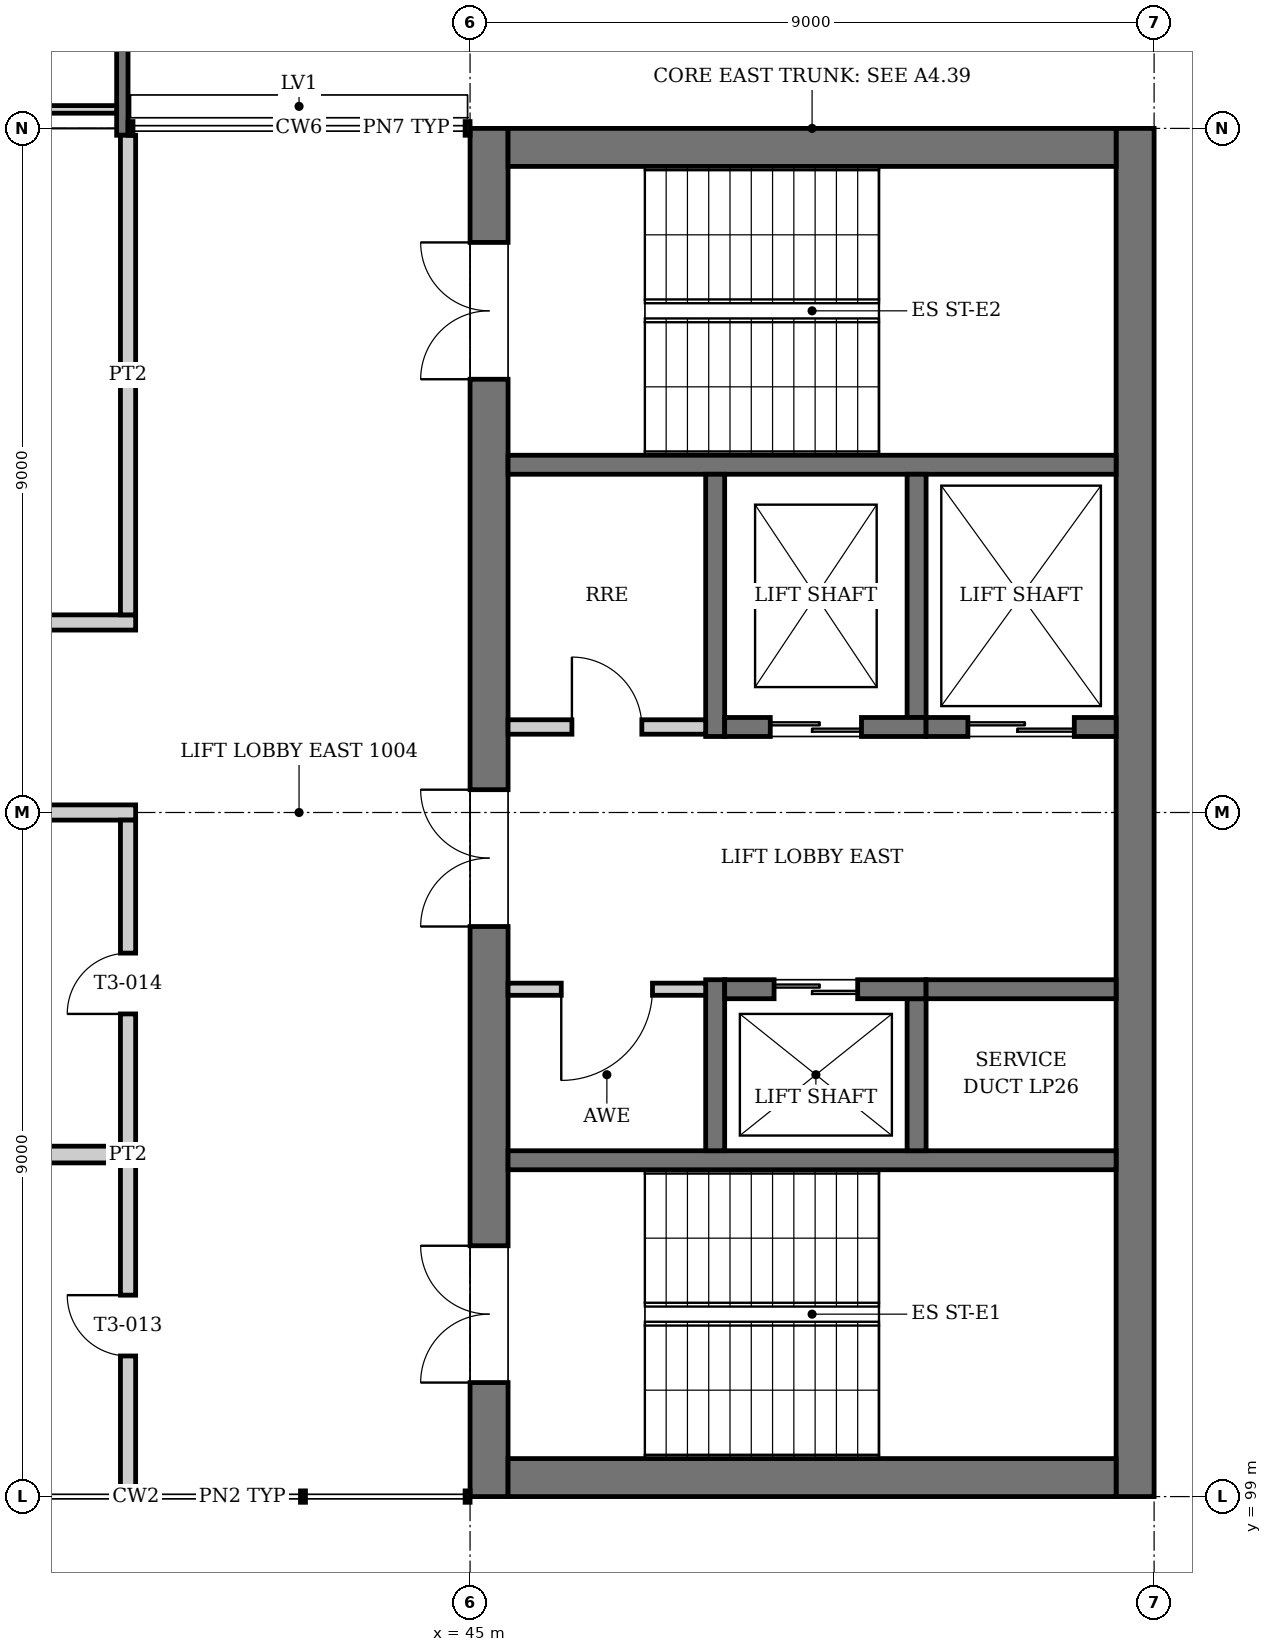
"""IFC4 building model, lengths in metres.
Left out: names, types, materials, properties, quantities, classifications, styles, units other than length and angle.
Written with IfcOpenShell. Run it as: python <this file> out.ifc"""

import sys

from ifc_helpers import new_model, si_unit, direction, frame, frame_2d, origin, place, context, subcontext, project, spatial, rectangle, extrude, element, fill, save


model = new_model("IFC4")
c1 = context("Model", 3, precision=1e-05, world=origin(), true_north=direction((0.0, 1.0)))
c2 = subcontext(c1, "Body", "Model", "MODEL_VIEW")
j1 = project(units=[si_unit("LENGTHUNIT", "METRE"), si_unit("PLANEANGLEUNIT", "RADIAN")], contexts=[c1])
p1 = place(None, origin())
s1 = spatial("IfcSite", under=j1, at=p1, CompositionType="ELEMENT")
p2 = place(p1, origin())
s2 = spatial("IfcBuilding", under=s1, at=p2, CompositionType="ELEMENT")
p3 = place(p2, frame((0.0, 0.0, 43.2)))
s3 = spatial("IfcBuildingStorey", under=s2, at=p3, CompositionType="ELEMENT", Elevation=43.2)
p4 = place(p3, frame((45.25, 99.0, 0.0), z_axis=(0.0, 0.0, 1.0), x_axis=(0.0, 1.0, 0.0)))
e1 = element("IfcWall", 1, at=p4, inside=s3, PredefinedType="SHEAR", context=c2, shape_type="SweptSolid", body=[
    extrude(rectangle(XDim=18.0, YDim=0.5, at=frame_2d((9.0, 0.0))), origin(), (0.0, 0.0, 1.0), 4.0),
])
p5 = place(p4, frame((1.5, 0.0, 0.0)))
e2 = element("IfcOpeningElement", 2, at=p5, cuts=e1, PredefinedType="OPENING", context=c2, shape_type="SweptSolid", body=[
    extrude(rectangle(XDim=1.8, YDim=2.1, at=frame_2d((0.9, 1.05))), frame((0.0, 0.26, 0.0), z_axis=(0.0, -1.0, 0.0), x_axis=(1.0, 0.0, 0.0)), (0.0, 0.0, 1.0), 0.52),
])
p6 = place(p4, frame((14.7, 0.0, 0.0)))
e3 = element("IfcOpeningElement", 3, at=p6, cuts=e1, PredefinedType="OPENING", context=c2, shape_type="SweptSolid", body=[
    extrude(rectangle(XDim=1.8, YDim=2.1, at=frame_2d((0.9, 1.05))), frame((0.0, 0.26, 0.0), z_axis=(0.0, -1.0, 0.0), x_axis=(1.0, 0.0, 0.0)), (0.0, 0.0, 1.0), 0.52),
])
p7 = place(p4, frame((7.5, 0.0, 0.0)))
e4 = element("IfcOpeningElement", 4, at=p7, cuts=e1, PredefinedType="OPENING", context=c2, shape_type="SweptSolid", body=[
    extrude(rectangle(XDim=1.8, YDim=2.1, at=frame_2d((0.9, 1.05))), frame((0.0, 0.26, 0.0), z_axis=(0.0, -1.0, 0.0), x_axis=(1.0, 0.0, 0.0)), (0.0, 0.0, 1.0), 0.52),
])
p8 = place(p3, frame((53.75, 99.0, 0.0), z_axis=(0.0, 0.0, 1.0), x_axis=(0.0, 1.0, 0.0)))
e5 = element("IfcWall", 5, at=p8, inside=s3, PredefinedType="SHEAR", context=c2, shape_type="SweptSolid", body=[
    extrude(rectangle(XDim=18.0, YDim=0.5, at=frame_2d((9.0, 0.0))), origin(), (0.0, 0.0, 1.0), 4.0),
])
for number, where, z_axis, x_axis in (
    (6, (45.5, 99.25, 0.0), (0.0, 0.0, 1.0), (1.0, 0.0, 0.0)),
    (7, (45.5, 116.75, 0.0), (0.0, 0.0, 1.0), (1.0, 0.0, 0.0)),
):
    element("IfcWall", number, at=place(p3, frame(where, z_axis=z_axis, x_axis=x_axis)), inside=s3, PredefinedType="SHEAR", context=c2, shape_type="SweptSolid", body=[
        extrude(rectangle(XDim=8.0, YDim=0.5, at=frame_2d((4.0, 0.0))), origin(), (0.0, 0.0, 1.0), 4.0),
    ])
p9 = place(p3, frame((40.425, 120.45, -0.15), z_axis=(0.0, 0.0, 1.0), x_axis=(0.0, -1.0, 0.0)))
e8 = element("IfcWall", 8, at=p9, inside=s3, PredefinedType="SOLIDWALL", context=c2, shape_type="SweptSolid", body=[
    extrude(rectangle(XDim=3.54, YDim=0.15, at=frame_2d((1.77, 0.0))), origin(), (0.0, 0.0, 1.0), 2.75),
])
p10 = place(p3, frame((31.65, 117.25, 0.0), z_axis=(0.0, 0.0, 1.0), x_axis=(1.0, 0.0, 0.0)))
e9 = element("IfcWall", 9, at=p10, inside=s3, PredefinedType="PARTITIONING", context=c2, shape_type="SweptSolid", body=[
    extrude(rectangle(XDim=8.7, YDim=0.1, at=frame_2d((4.35, 0.0))), origin(), (0.0, 0.0, 1.0), 2.6),
])
p11 = place(p10, frame((4.6, 0.0, 0.0)))
e10 = element("IfcOpeningElement", 10, at=p11, cuts=e9, PredefinedType="OPENING", context=c2, shape_type="SweptSolid", body=[
    extrude(rectangle(XDim=0.9, YDim=2.1, at=frame_2d((0.45, 1.05))), frame((0.0, 0.06, 0.0), z_axis=(0.0, -1.0, 0.0), x_axis=(1.0, 0.0, 0.0)), (0.0, 0.0, 1.0), 0.12),
])
for number, where, z_axis, x_axis in (
    (11, (45.5, 103.425, 0.0), (0.0, 0.0, 1.0), (1.0, 0.0, 0.0)),
    (12, (45.5, 112.575, 0.0), (0.0, 0.0, 1.0), (1.0, 0.0, 0.0)),
):
    element("IfcWall", number, at=place(p3, frame(where, z_axis=z_axis, x_axis=x_axis)), inside=s3, PredefinedType="SOLIDWALL", context=c2, shape_type="SweptSolid", body=[
        extrude(rectangle(XDim=8.0, YDim=0.25, at=frame_2d((4.0, 0.0))), origin(), (0.0, 0.0, 1.0), 3.75),
    ])
p12 = place(p3, frame((48.225, 103.55, 0.0), z_axis=(0.0, 0.0, 1.0), x_axis=(0.0, 1.0, 0.0)))
e13 = element("IfcWall", 13, at=p12, inside=s3, PredefinedType="SOLIDWALL", context=c2, shape_type="SweptSolid", body=[
    extrude(rectangle(XDim=2.25, YDim=0.25, at=frame_2d((1.125, 0.0))), origin(), (0.0, 0.0, 1.0), 4.0),
])
p13 = place(p3, frame((50.875, 103.55, 0.0), z_axis=(0.0, 0.0, 1.0), x_axis=(0.0, 1.0, 0.0)))
e14 = element("IfcWall", 14, at=p13, inside=s3, PredefinedType="SOLIDWALL", context=c2, shape_type="SweptSolid", body=[
    extrude(rectangle(XDim=2.0, YDim=0.25, at=frame_2d((1.0, 0.0))), origin(), (0.0, 0.0, 1.0), 4.0),
])
p14 = place(p3, frame((48.35, 105.675, 0.0), z_axis=(0.0, 0.0, 1.0), x_axis=(1.0, 0.0, 0.0)))
e15 = element("IfcWall", 15, at=p14, inside=s3, PredefinedType="SOLIDWALL", context=c2, shape_type="SweptSolid", body=[
    extrude(rectangle(XDim=2.65, YDim=0.25, at=frame_2d((1.325, 0.0))), origin(), (0.0, 0.0, 1.0), 4.0),
])
p15 = place(p14, frame((0.65, 0.0, 0.0)))
e16 = element("IfcOpeningElement", 16, at=p15, cuts=e15, PredefinedType="OPENING", context=c2, shape_type="SweptSolid", body=[
    extrude(rectangle(XDim=1.1, YDim=2.1, at=frame_2d((0.55, 1.05))), frame((0.0, 0.135, 0.0), z_axis=(0.0, -1.0, 0.0), x_axis=(1.0, 0.0, 0.0)), (0.0, 0.0, 1.0), 0.27),
])
p16 = place(p3, frame((51.0, 105.675, 0.0), z_axis=(0.0, 0.0, 1.0), x_axis=(1.0, 0.0, 0.0)))
e17 = element("IfcWall", 17, at=p16, inside=s3, PredefinedType="SOLIDWALL", context=c2, shape_type="SweptSolid", body=[
    extrude(rectangle(XDim=2.5, YDim=0.25, at=frame_2d((1.25, 0.0))), origin(), (0.0, 0.0, 1.0), 4.0),
])
p17 = place(p3, frame((48.225, 109.0, 0.0), z_axis=(0.0, 0.0, 1.0), x_axis=(0.0, 1.0, 0.0)))
e18 = element("IfcWall", 18, at=p17, inside=s3, PredefinedType="SOLIDWALL", context=c2, shape_type="SweptSolid", body=[
    extrude(rectangle(XDim=3.45, YDim=0.25, at=frame_2d((1.725, 0.0))), origin(), (0.0, 0.0, 1.0), 4.0),
])
p18 = place(p3, frame((50.875, 109.25, 0.0), z_axis=(0.0, 0.0, 1.0), x_axis=(0.0, 1.0, 0.0)))
e19 = element("IfcWall", 19, at=p18, inside=s3, PredefinedType="SOLIDWALL", context=c2, shape_type="SweptSolid", body=[
    extrude(rectangle(XDim=3.2, YDim=0.25, at=frame_2d((1.6, 0.0))), origin(), (0.0, 0.0, 1.0), 4.0),
])
p19 = place(p3, frame((48.35, 109.125, 0.0), z_axis=(0.0, 0.0, 1.0), x_axis=(1.0, 0.0, 0.0)))
e20 = element("IfcWall", 20, at=p19, inside=s3, PredefinedType="SOLIDWALL", context=c2, shape_type="SweptSolid", body=[
    extrude(rectangle(XDim=2.65, YDim=0.25, at=frame_2d((1.325, 0.0))), origin(), (0.0, 0.0, 1.0), 4.0),
])
p20 = place(p19, frame((0.6, 0.0, 0.0)))
e21 = element("IfcOpeningElement", 21, at=p20, cuts=e20, PredefinedType="OPENING", context=c2, shape_type="SweptSolid", body=[
    extrude(rectangle(XDim=1.2, YDim=2.1, at=frame_2d((0.6, 1.05))), frame((0.0, 0.135, 0.0), z_axis=(0.0, -1.0, 0.0), x_axis=(1.0, 0.0, 0.0)), (0.0, 0.0, 1.0), 0.27),
])
p21 = place(p3, frame((51.0, 109.125, 0.0), z_axis=(0.0, 0.0, 1.0), x_axis=(1.0, 0.0, 0.0)))
e22 = element("IfcWall", 22, at=p21, inside=s3, PredefinedType="SOLIDWALL", context=c2, shape_type="SweptSolid", body=[
    extrude(rectangle(XDim=2.5, YDim=0.25, at=frame_2d((1.25, 0.0))), origin(), (0.0, 0.0, 1.0), 4.0),
])
p22 = place(p21, frame((0.55, 0.0, 0.0)))
e23 = element("IfcOpeningElement", 23, at=p22, cuts=e22, PredefinedType="OPENING", context=c2, shape_type="SweptSolid", body=[
    extrude(rectangle(XDim=1.4, YDim=2.4, at=frame_2d((0.7, 1.2))), frame((0.0, 0.135, 0.0), z_axis=(0.0, -1.0, 0.0), x_axis=(1.0, 0.0, 0.0)), (0.0, 0.0, 1.0), 0.27),
])
p23 = place(p3, frame((45.5, 105.675, 0.0), z_axis=(0.0, 0.0, 1.0), x_axis=(1.0, 0.0, 0.0)))
e24 = element("IfcWall", 24, at=p23, inside=s3, PredefinedType="PARTITIONING", context=c2, shape_type="SweptSolid", body=[
    extrude(rectangle(XDim=2.6, YDim=0.16, at=frame_2d((1.3, 0.0))), origin(), (0.0, 0.0, 1.0), 3.75),
])
p24 = place(p23, frame((0.7, 0.0, 0.0)))
e25 = element("IfcOpeningElement", 25, at=p24, cuts=e24, PredefinedType="OPENING", context=c2, shape_type="SweptSolid", body=[
    extrude(rectangle(XDim=1.2, YDim=2.1, at=frame_2d((0.6, 1.05))), frame((0.0, 0.09, 0.0), z_axis=(0.0, -1.0, 0.0), x_axis=(1.0, 0.0, 0.0)), (0.0, 0.0, 1.0), 0.18),
])
p25 = place(p3, frame((45.5, 109.125, 0.0), z_axis=(0.0, 0.0, 1.0), x_axis=(1.0, 0.0, 0.0)))
e26 = element("IfcWall", 26, at=p25, inside=s3, PredefinedType="PARTITIONING", context=c2, shape_type="SweptSolid", body=[
    extrude(rectangle(XDim=2.6, YDim=0.19, at=frame_2d((1.3, 0.0))), origin(), (0.0, 0.0, 1.0), 3.75),
])
p26 = place(p25, frame((0.84, 0.0, 0.0)))
e27 = element("IfcOpeningElement", 27, at=p26, cuts=e26, PredefinedType="OPENING", context=c2, shape_type="SweptSolid", body=[
    extrude(rectangle(XDim=0.92, YDim=2.1, at=frame_2d((0.46, 1.05))), frame((0.0, 0.105, 0.0), z_axis=(0.0, -1.0, 0.0), x_axis=(1.0, 0.0, 0.0)), (0.0, 0.0, 1.0), 0.21),
])
p27 = place(p3, frame((36.075, 103.5, 0.0), z_axis=(0.0, 0.0, 1.0), x_axis=(1.0, 0.0, 0.0)))
e28 = element("IfcWall", 28, at=p27, inside=s3, PredefinedType="PLUMBINGWALL", context=c2, shape_type="SweptSolid", body=[
    extrude(rectangle(XDim=4.325, YDim=0.22, at=frame_2d((2.163, 0.0))), origin(), (0.0, 0.0, 1.0), 3.05),
])
p28 = place(p3, frame((35.925, 108.0, 0.0), z_axis=(0.0, 0.0, 1.0), x_axis=(1.0, 0.0, 0.0)))
e29 = element("IfcWall", 29, at=p28, inside=s3, PredefinedType="PARTITIONING", context=c2, shape_type="SweptSolid", body=[
    extrude(rectangle(XDim=4.675, YDim=0.2, at=frame_2d((2.337, 0.0))), origin(), (0.0, 0.0, 1.0), 3.05),
])
p29 = place(p3, frame((17.9, 110.5, 0.0), z_axis=(0.0, 0.0, 1.0), x_axis=(1.0, 0.0, 0.0)))
e30 = element("IfcWall", 30, at=p29, inside=s3, PredefinedType="PARTITIONING", context=c2, shape_type="SweptSolid", body=[
    extrude(rectangle(XDim=22.7, YDim=0.2, at=frame_2d((11.35, 0.0))), origin(), (0.0, 0.0, 1.0), 3.05),
])
p30 = place(p29, frame((10.45, 0.0, 0.0)))
e31 = element("IfcOpeningElement", 31, at=p30, cuts=e30, PredefinedType="OPENING", context=c2, shape_type="SweptSolid", body=[
    extrude(rectangle(XDim=1.8, YDim=2.1, at=frame_2d((0.9, 1.05))), frame((0.0, 0.11, 0.0), z_axis=(0.0, -1.0, 0.0), x_axis=(1.0, 0.0, 0.0)), (0.0, 0.0, 1.0), 0.22),
])
p31 = place(p3, frame((40.5, 99.075, 0.0), z_axis=(0.0, 0.0, 1.0), x_axis=(0.0, 1.0, 0.0)))
e32 = element("IfcWall", 32, at=p31, inside=s3, PredefinedType="PARTITIONING", context=c2, shape_type="SweptSolid", body=[
    extrude(rectangle(XDim=8.825, YDim=0.2, at=frame_2d((4.413, 0.0))), origin(), (0.0, 0.0, 1.0), 3.05),
])
p32 = place(p31, frame((1.775, 0.0, 0.0)))
e33 = element("IfcOpeningElement", 33, at=p32, cuts=e32, PredefinedType="OPENING", context=c2, shape_type="SweptSolid", body=[
    extrude(rectangle(XDim=0.8, YDim=2.1, at=frame_2d((0.4, 1.05))), frame((0.0, 0.11, 0.0), z_axis=(0.0, -1.0, 0.0), x_axis=(1.0, 0.0, 0.0)), (0.0, 0.0, 1.0), 0.22),
])
p33 = place(p31, frame((6.275, 0.0, 0.0)))
e34 = element("IfcOpeningElement", 34, at=p33, cuts=e32, PredefinedType="OPENING", context=c2, shape_type="SweptSolid", body=[
    extrude(rectangle(XDim=0.8, YDim=2.1, at=frame_2d((0.4, 1.05))), frame((0.0, 0.11, 0.0), z_axis=(0.0, -1.0, 0.0), x_axis=(1.0, 0.0, 0.0)), (0.0, 0.0, 1.0), 0.22),
])
p34 = place(p3, frame((40.5, 110.6, 0.0), z_axis=(0.0, 0.0, 1.0), x_axis=(0.0, 1.0, 0.0)))
e35 = element("IfcWall", 35, at=p34, inside=s3, PredefinedType="PARTITIONING", context=c2, shape_type="SweptSolid", body=[
    extrude(rectangle(XDim=6.31, YDim=0.2, at=frame_2d((3.155, 0.0))), origin(), (0.0, 0.0, 1.0), 3.05),
])
p35 = place(p15, origin())
e36 = element("IfcDoor", 36, at=p35, inside=s3, OperationType="DOUBLE_DOOR_SLIDING", PredefinedType="DOOR", context=c2, shape_type="SweptSolid", body=[
    extrude(rectangle(XDim=1.1, YDim=2.1, at=frame_2d((0.55, 1.05))), frame((0.0, 0.025, 0.0), z_axis=(0.0, -1.0, 0.0), x_axis=(1.0, 0.0, 0.0)), (0.0, 0.0, 1.0), 0.05),
])
fill(e16, e36)
p36 = place(p20, origin())
e37 = element("IfcDoor", 37, at=p36, inside=s3, OperationType="DOUBLE_DOOR_SLIDING", PredefinedType="DOOR", context=c2, shape_type="SweptSolid", body=[
    extrude(rectangle(XDim=1.2, YDim=2.1, at=frame_2d((0.6, 1.05))), frame((0.0, 0.025, 0.0), z_axis=(0.0, -1.0, 0.0), x_axis=(1.0, 0.0, 0.0)), (0.0, 0.0, 1.0), 0.05),
])
fill(e21, e37)
p37 = place(p22, origin())
e38 = element("IfcDoor", 38, at=p37, inside=s3, OperationType="DOUBLE_DOOR_SLIDING", PredefinedType="DOOR", context=c2, shape_type="SweptSolid", body=[
    extrude(rectangle(XDim=1.4, YDim=2.4, at=frame_2d((0.7, 1.2))), frame((0.0, 0.025, 0.0), z_axis=(0.0, -1.0, 0.0), x_axis=(1.0, 0.0, 0.0)), (0.0, 0.0, 1.0), 0.05),
])
fill(e23, e38)
p38 = place(p32, origin())
e39 = element("IfcDoor", 39, at=p38, inside=s3, OperationType="SINGLE_SWING_RIGHT", PredefinedType="DOOR", context=c2, shape_type="SweptSolid", body=[
    extrude(rectangle(XDim=0.8, YDim=2.1, at=frame_2d((0.4, 1.05))), frame((0.0, 0.025, 0.0), z_axis=(0.0, -1.0, 0.0), x_axis=(1.0, 0.0, 0.0)), (0.0, 0.0, 1.0), 0.05),
])
fill(e33, e39)
p39 = place(p33, origin())
e40 = element("IfcDoor", 40, at=p39, inside=s3, OperationType="SINGLE_SWING_LEFT", PredefinedType="DOOR", context=c2, shape_type="SweptSolid", body=[
    extrude(rectangle(XDim=0.8, YDim=2.1, at=frame_2d((0.4, 1.05))), frame((0.0, 0.025, 0.0), z_axis=(0.0, -1.0, 0.0), x_axis=(1.0, 0.0, 0.0)), (0.0, 0.0, 1.0), 0.05),
])
fill(e34, e40)
p40 = place(p5, origin())
e41 = element("IfcDoor", 41, at=p40, inside=s3, OperationType="DOUBLE_DOOR_SINGLE_SWING", PredefinedType="DOOR", context=c2, shape_type="SweptSolid", body=[
    extrude(rectangle(XDim=1.8, YDim=2.1, at=frame_2d((0.9, 1.05))), frame((0.0, 0.025, 0.0), z_axis=(0.0, -1.0, 0.0), x_axis=(1.0, 0.0, 0.0)), (0.0, 0.0, 1.0), 0.05),
])
fill(e2, e41)
p41 = place(p6, origin())
e42 = element("IfcDoor", 42, at=p41, inside=s3, OperationType="DOUBLE_DOOR_SINGLE_SWING", PredefinedType="DOOR", context=c2, shape_type="SweptSolid", body=[
    extrude(rectangle(XDim=1.8, YDim=2.1, at=frame_2d((0.9, 1.05))), frame((0.0, 0.025, 0.0), z_axis=(0.0, -1.0, 0.0), x_axis=(1.0, 0.0, 0.0)), (0.0, 0.0, 1.0), 0.05),
])
fill(e3, e42)
p42 = place(p7, origin())
e43 = element("IfcDoor", 43, at=p42, inside=s3, OperationType="DOUBLE_DOOR_SINGLE_SWING", PredefinedType="DOOR", context=c2, shape_type="SweptSolid", body=[
    extrude(rectangle(XDim=1.8, YDim=2.1, at=frame_2d((0.9, 1.05))), frame((0.0, 0.025, 0.0), z_axis=(0.0, -1.0, 0.0), x_axis=(1.0, 0.0, 0.0)), (0.0, 0.0, 1.0), 0.05),
])
fill(e4, e43)
p43 = place(p24, frame((1.2, 0.0, 0.0), z_axis=(0.0, 0.0, 1.0), x_axis=(-1.0, 0.0, 0.0)))
e44 = element("IfcDoor", 44, at=p43, inside=s3, OperationType="SINGLE_SWING_RIGHT", PredefinedType="DOOR", context=c2, shape_type="SweptSolid", body=[
    extrude(rectangle(XDim=1.2, YDim=2.1, at=frame_2d((0.6, 1.05))), frame((0.0, 0.025, 0.0), z_axis=(0.0, -1.0, 0.0), x_axis=(1.0, 0.0, 0.0)), (0.0, 0.0, 1.0), 0.05),
])
fill(e25, e44)
p44 = place(p26, origin())
e45 = element("IfcDoor", 45, at=p44, inside=s3, OperationType="SINGLE_SWING_LEFT", PredefinedType="DOOR", context=c2, shape_type="SweptSolid", body=[
    extrude(rectangle(XDim=0.92, YDim=2.1, at=frame_2d((0.46, 1.05))), frame((0.0, 0.025, 0.0), z_axis=(0.0, -1.0, 0.0), x_axis=(1.0, 0.0, 0.0)), (0.0, 0.0, 1.0), 0.05),
])
fill(e27, e45)
save(model, sys.argv[1])
